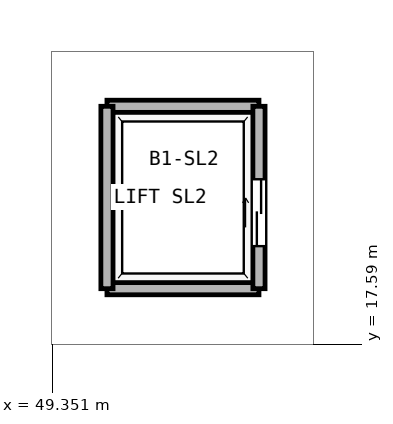
"""IFC4 building model, lengths in metres.
Left out: names, types, materials, properties, quantities, classifications, styles, units other than length and angle.
Written with IfcOpenShell. Run it as: python <this file> out.ifc"""

import sys

from ifc_helpers import new_model, si_unit, direction, frame, frame_2d, origin, place, context, subcontext, project, spatial, rectangle, extrude, element, fill, save


model = new_model("IFC4")
c1 = context("Model", 3, precision=1e-05, world=origin(), true_north=direction((0.0, 1.0)))
c2 = subcontext(c1, "Body", "Model", "MODEL_VIEW")
j1 = project(units=[si_unit("LENGTHUNIT", "METRE"), si_unit("PLANEANGLEUNIT", "RADIAN")], contexts=[c1])
p1 = place(None, origin())
s1 = spatial("IfcSite", under=j1, at=p1, CompositionType="ELEMENT")
p2 = place(p1, origin())
s2 = spatial("IfcBuilding", under=s1, at=p2, CompositionType="ELEMENT")
p3 = place(p2, frame((0.0, 0.0, -4.2)))
s3 = spatial("IfcBuildingStorey", under=s2, at=p3, CompositionType="ELEMENT", Elevation=-4.2)
for number, where, z_axis, x_axis in (
    (1, (50.25, 18.5, 0.0), (0.0, 0.0, 1.0), (1.0, 0.0, 0.0)),
    (2, (50.25, 21.5, 0.0), (0.0, 0.0, 1.0), (1.0, 0.0, 0.0)),
):
    element("IfcWall", number, at=place(p3, frame(where, z_axis=z_axis, x_axis=x_axis)), inside=s3, PredefinedType="PARTITIONING", context=c2, shape_type="SweptSolid", body=[
        extrude(rectangle(XDim=2.5, YDim=0.2, at=frame_2d((1.25, 0.0))), origin(), (0.0, 0.0, 1.0), 3.88),
    ])
p4 = place(p3, frame((50.25, 18.5, 0.0), z_axis=(0.0, 0.0, 1.0), x_axis=(0.0, 1.0, 0.0)))
e3 = element("IfcWall", 3, at=p4, inside=s3, PredefinedType="PARTITIONING", context=c2, shape_type="SweptSolid", body=[
    extrude(rectangle(XDim=3.0, YDim=0.2, at=frame_2d((1.5, 0.0))), origin(), (0.0, 0.0, 1.0), 3.88),
])
p5 = place(p3, frame((52.75, 18.5, 0.0), z_axis=(0.0, 0.0, 1.0), x_axis=(0.0, 1.0, 0.0)))
e4 = element("IfcWall", 4, at=p5, inside=s3, PredefinedType="PARTITIONING", context=c2, shape_type="SweptSolid", body=[
    extrude(rectangle(XDim=3.0, YDim=0.2, at=frame_2d((1.5, 0.0))), origin(), (0.0, 0.0, 1.0), 3.88),
])
p6 = place(p5, frame((0.7, 0.0, 0.0)))
e5 = element("IfcOpeningElement", 5, at=p6, cuts=e4, PredefinedType="OPENING", context=c2, shape_type="SweptSolid", body=[
    extrude(rectangle(XDim=1.1, YDim=2.25, at=frame_2d((0.55, 1.125))), frame((0.0, 0.11, 0.0), z_axis=(0.0, -1.0, 0.0), x_axis=(1.0, 0.0, 0.0)), (0.0, 0.0, 1.0), 0.22),
])
p7 = place(p6, origin())
e6 = element("IfcDoor", 6, at=p7, inside=s3, OperationType="DOUBLE_DOOR_SLIDING", PredefinedType="DOOR", context=c2, shape_type="SweptSolid", body=[
    extrude(rectangle(XDim=1.1, YDim=2.25, at=frame_2d((0.55, 1.125))), frame((0.0, 0.025, 0.0), z_axis=(0.0, -1.0, 0.0), x_axis=(1.0, 0.0, 0.0)), (0.0, 0.0, 1.0), 0.05),
])
fill(e5, e6)
save(model, sys.argv[1])
